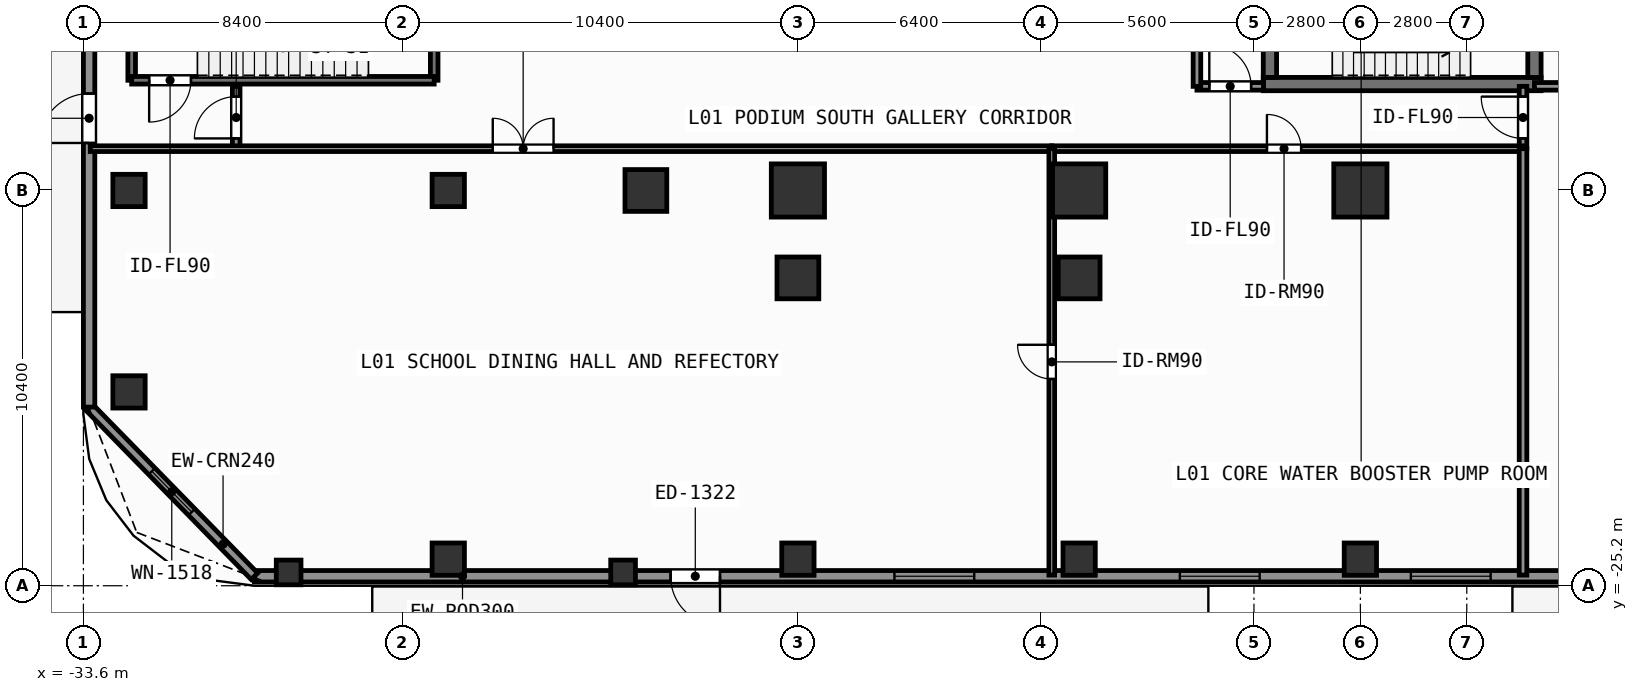
"""IFC4 building model, lengths in metres.
Left out: names, types, materials, properties, quantities, classifications, styles, units other than length and angle.
Written with IfcOpenShell. Run it as: python <this file> out.ifc"""

import sys

from ifc_helpers import new_model, si_unit, direction, frame, frame_2d, origin, origin_2d, place, context, subcontext, project, spatial, rectangle, extrude, element, fill, save


model = new_model("IFC4")
c1 = context("Model", 3, precision=1e-05, world=origin(), true_north=direction((0.0, 1.0)))
c2 = subcontext(c1, "Body", "Model", "MODEL_VIEW")
j1 = project(units=[si_unit("LENGTHUNIT", "METRE"), si_unit("PLANEANGLEUNIT", "RADIAN")], contexts=[c1])
p1 = place(None, origin())
s1 = spatial("IfcSite", under=j1, at=p1, CompositionType="ELEMENT")
p2 = place(p1, origin())
s2 = spatial("IfcBuilding", under=s1, at=p2, CompositionType="ELEMENT")
p3 = place(p2, origin())
s3 = spatial("IfcBuildingStorey", under=s2, at=p3, CompositionType="ELEMENT", Elevation=0.0)
p4 = place(p3, frame((-2.555, -12.0, 0.0), z_axis=(0.0, 0.0, 1.0), x_axis=(1.0, 0.0, 0.0)))
e1 = element("IfcWall", 1, at=p4, inside=s3, PredefinedType="SHEAR", context=c2, shape_type="SweptSolid", body=[
    extrude(rectangle(XDim=7.31, YDim=0.35, at=frame_2d((3.655, 0.0))), origin(), (0.0, 0.0, 1.0), 4.8),
])
p5 = place(p3, frame((-2.38, -11.825, 0.0), z_axis=(0.0, 0.0, 1.0), x_axis=(0.0, 1.0, 0.0)))
e2 = element("IfcWall", 2, at=p5, inside=s3, PredefinedType="SHEAR", context=c2, shape_type="SweptSolid", body=[
    extrude(rectangle(XDim=2.925, YDim=0.35, at=frame_2d((1.462, 0.0))), origin(), (0.0, 0.0, 1.0), 4.8),
])
p6 = place(p3, frame((4.58, -8.9, 0.0), z_axis=(0.0, 0.0, 1.0), x_axis=(0.0, -1.0, 0.0)))
e3 = element("IfcWall", 3, at=p6, inside=s3, PredefinedType="SHEAR", context=c2, shape_type="SweptSolid", body=[
    extrude(rectangle(XDim=2.925, YDim=0.35, at=frame_2d((1.462, 0.0))), origin(), (0.0, 0.0, 1.0), 4.8),
])
p7 = place(p6, frame((0.913, 0.0, 0.0)))
e4 = element("IfcOpeningElement", 4, at=p7, cuts=e3, PredefinedType="OPENING", context=c2, shape_type="SweptSolid", body=[
    extrude(rectangle(XDim=1.1, YDim=2.15, at=frame_2d((0.55, 1.075))), frame((0.0, 0.185, 0.0), z_axis=(0.0, -1.0, 0.0), x_axis=(1.0, 0.0, 0.0)), (0.0, 0.0, 1.0), 0.37),
])
for number, where, z_axis, x_axis in (
    (5, (-14.8, -14.8, 0.0), (0.0, 0.0, 1.0), (1.0, 0.0, 0.0)),
    (6, (-7.4, -14.8, 0.0), (0.0, 0.0, 1.0), (1.0, 0.0, 0.0)),
    (7, (0.0, -14.8, 0.0), (0.0, 0.0, 1.0), (1.0, 0.0, 0.0)),
):
    element("IfcColumn", number, at=place(p3, frame(where, z_axis=z_axis, x_axis=x_axis)), inside=s3, PredefinedType="COLUMN", context=c2, shape_type="SweptSolid", body=[
        extrude(rectangle(XDim=1.4, YDim=1.4, at=origin_2d()), origin(), (0.0, 0.0, 1.0), 4.8),
    ])
for number, where, z_axis, x_axis in (
    (8, (-18.8, -14.8, 0.0), (0.0, 0.0, 1.0), (1.0, 0.0, 0.0)),
    (9, (-14.8, -17.1, 0.0), (0.0, 0.0, 1.0), (1.0, 0.0, 0.0)),
    (10, (-7.4, -17.1, 0.0), (0.0, 0.0, 1.0), (1.0, 0.0, 0.0)),
):
    element("IfcColumn", number, at=place(p3, frame(where, z_axis=z_axis, x_axis=x_axis)), inside=s3, PredefinedType="COLUMN", context=c2, shape_type="SweptSolid", body=[
        extrude(rectangle(XDim=1.1, YDim=1.1, at=origin_2d()), origin(), (0.0, 0.0, 1.0), 4.8),
    ])
for number, where, z_axis, x_axis in (
    (11, (-32.4, -14.8, 0.0), (0.0, 0.0, 1.0), (1.0, 0.0, 0.0)),
    (12, (-24.0, -24.5, 0.0), (0.0, 0.0, 1.0), (1.0, 0.0, 0.0)),
    (13, (-24.0, -14.8, 0.0), (0.0, 0.0, 1.0), (1.0, 0.0, 0.0)),
    (14, (-14.8, -24.5, 0.0), (0.0, 0.0, 1.0), (1.0, 0.0, 0.0)),
    (15, (-7.4, -24.5, 0.0), (0.0, 0.0, 1.0), (1.0, 0.0, 0.0)),
    (16, (0.0, -24.5, 0.0), (0.0, 0.0, 1.0), (1.0, 0.0, 0.0)),
    (17, (-32.4, -20.1, 0.0), (0.0, 0.0, 1.0), (1.0, 0.0, 0.0)),
):
    element("IfcColumn", number, at=place(p3, frame(where, z_axis=z_axis, x_axis=x_axis)), inside=s3, PredefinedType="COLUMN", context=c2, shape_type="SweptSolid", body=[
        extrude(rectangle(XDim=0.85, YDim=0.85, at=origin_2d()), origin(), (0.0, 0.0, 1.0), 4.8),
    ])
for number, where, z_axis, x_axis in (
    (18, (-28.2, -24.85, 0.0), (0.0, 0.0, 1.0), (1.0, 0.0, 0.0)),
    (19, (-19.4, -24.85, 0.0), (0.0, 0.0, 1.0), (1.0, 0.0, 0.0)),
):
    element("IfcColumn", number, at=place(p3, frame(where, z_axis=z_axis, x_axis=x_axis)), inside=s3, PredefinedType="PILASTER", context=c2, shape_type="SweptSolid", body=[
        extrude(rectangle(XDim=0.65, YDim=0.65, at=origin_2d()), origin(), (0.0, 0.0, 1.0), 4.8),
    ])
p8 = place(p3, frame((29.1, -24.95, 0.0), z_axis=(0.0, 0.0, 1.0), x_axis=(-1.0, 0.0, 0.0)))
e20 = element("IfcWall", 20, at=p8, inside=s3, PredefinedType="SOLIDWALL", context=c2, shape_type="SweptSolid", body=[
    extrude(rectangle(XDim=58.2, YDim=0.3, at=frame_2d((29.1, 0.0))), origin(), (0.0, 0.0, 1.0), 4.56),
])
p9 = place(p8, frame((39.26, 0.0, 0.85)))
e21 = element("IfcOpeningElement", 21, at=p9, cuts=e20, PredefinedType="OPENING", context=c2, shape_type="SweptSolid", body=[
    extrude(rectangle(XDim=2.1, YDim=2.2, at=frame_2d((1.05, 1.1))), frame((0.0, 0.16, 0.0), z_axis=(0.0, -1.0, 0.0), x_axis=(1.0, 0.0, 0.0)), (0.0, 0.0, 1.0), 0.32),
])
p10 = place(p8, frame((31.75, 0.0, 0.85)))
e22 = element("IfcOpeningElement", 22, at=p10, cuts=e20, PredefinedType="OPENING", context=c2, shape_type="SweptSolid", body=[
    extrude(rectangle(XDim=2.1, YDim=2.2, at=frame_2d((1.05, 1.1))), frame((0.0, 0.16, 0.0), z_axis=(0.0, -1.0, 0.0), x_axis=(1.0, 0.0, 0.0)), (0.0, 0.0, 1.0), 0.32),
])
p11 = place(p8, frame((25.672, 0.0, 0.85)))
e23 = element("IfcOpeningElement", 23, at=p11, cuts=e20, PredefinedType="OPENING", context=c2, shape_type="SweptSolid", body=[
    extrude(rectangle(XDim=2.1, YDim=2.2, at=frame_2d((1.05, 1.1))), frame((0.0, 0.16, 0.0), z_axis=(0.0, -1.0, 0.0), x_axis=(1.0, 0.0, 0.0)), (0.0, 0.0, 1.0), 0.32),
])
p12 = place(p8, frame((17.65, 0.0, 0.0)))
e24 = element("IfcOpeningElement", 24, at=p12, cuts=e20, PredefinedType="OPENING", context=c2, shape_type="SweptSolid", body=[
    extrude(rectangle(XDim=1.3, YDim=2.2, at=frame_2d((0.65, 1.1))), frame((0.0, 0.16, 0.0), z_axis=(0.0, -1.0, 0.0), x_axis=(1.0, 0.0, 0.0)), (0.0, 0.0, 1.0), 0.32),
])
p13 = place(p8, frame((6.75, 0.0, 0.0)))
e25 = element("IfcOpeningElement", 25, at=p13, cuts=e20, PredefinedType="OPENING", context=c2, shape_type="SweptSolid", body=[
    extrude(rectangle(XDim=1.3, YDim=2.2, at=frame_2d((0.65, 1.1))), frame((0.0, 0.16, 0.0), z_axis=(0.0, -1.0, 0.0), x_axis=(1.0, 0.0, 0.0)), (0.0, 0.0, 1.0), 0.32),
])
p14 = place(p8, frame((45.95, 0.0, 0.0)))
e26 = element("IfcOpeningElement", 26, at=p14, cuts=e20, PredefinedType="OPENING", context=c2, shape_type="SweptSolid", body=[
    extrude(rectangle(XDim=1.3, YDim=2.2, at=frame_2d((0.65, 1.1))), frame((0.0, 0.16, 0.0), z_axis=(0.0, -1.0, 0.0), x_axis=(1.0, 0.0, 0.0)), (0.0, 0.0, 1.0), 0.32),
])
p15 = place(p3, frame((-29.1, -24.95, 0.0), z_axis=(0.0, 0.0, 1.0), x_axis=(-0.69901822973, 0.715103848756, 0.0)))
e27 = element("IfcWall", 27, at=p15, inside=s3, PredefinedType="SOLIDWALL", context=c2, shape_type="SweptSolid", body=[
    extrude(rectangle(XDim=6.223, YDim=0.24, at=frame_2d((3.111, 0.0))), origin(), (0.0, 0.0, 1.0), 4.56),
])
p16 = place(p15, frame((2.362, 0.0, 0.85)))
e28 = element("IfcOpeningElement", 28, at=p16, cuts=e27, PredefinedType="OPENING", context=c2, shape_type="SweptSolid", body=[
    extrude(rectangle(XDim=1.5, YDim=1.85, at=frame_2d((0.75, 0.925))), frame((0.0, 0.13, 0.0), z_axis=(0.0, -1.0, 0.0), x_axis=(1.0, 0.0, 0.0)), (0.0, 0.0, 1.0), 0.26),
])
p17 = place(p3, frame((-33.45, -20.5, 0.0), z_axis=(0.0, 0.0, 1.0), x_axis=(0.0, 1.0, 0.0)))
e29 = element("IfcWall", 29, at=p17, inside=s3, PredefinedType="SOLIDWALL", context=c2, shape_type="SweptSolid", body=[
    extrude(rectangle(XDim=41.0, YDim=0.3, at=frame_2d((20.5, 0.0))), origin(), (0.0, 0.0, 1.0), 4.56),
])
p18 = place(p17, frame((15.9, 0.0, 0.0)))
e30 = element("IfcOpeningElement", 30, at=p18, cuts=e29, PredefinedType="OPENING", context=c2, shape_type="SweptSolid", body=[
    extrude(rectangle(XDim=2.0, YDim=2.4, at=frame_2d((1.0, 1.2))), frame((0.0, 0.16, 0.0), z_axis=(0.0, -1.0, 0.0), x_axis=(1.0, 0.0, 0.0)), (0.0, 0.0, 1.0), 0.32),
])
p19 = place(p17, frame((23.1, 0.0, 0.0)))
e31 = element("IfcOpeningElement", 31, at=p19, cuts=e29, PredefinedType="OPENING", context=c2, shape_type="SweptSolid", body=[
    extrude(rectangle(XDim=2.0, YDim=2.4, at=frame_2d((1.0, 1.2))), frame((0.0, 0.16, 0.0), z_axis=(0.0, -1.0, 0.0), x_axis=(1.0, 0.0, 0.0)), (0.0, 0.0, 1.0), 0.32),
])
p20 = place(p17, frame((6.95, 0.0, 0.0)))
e32 = element("IfcOpeningElement", 32, at=p20, cuts=e29, PredefinedType="OPENING", context=c2, shape_type="SweptSolid", body=[
    extrude(rectangle(XDim=1.3, YDim=2.2, at=frame_2d((0.65, 1.1))), frame((0.0, 0.16, 0.0), z_axis=(0.0, -1.0, 0.0), x_axis=(1.0, 0.0, 0.0)), (0.0, 0.0, 1.0), 0.32),
])
p21 = place(p17, frame((32.75, 0.0, 0.0)))
e33 = element("IfcOpeningElement", 33, at=p21, cuts=e29, PredefinedType="OPENING", context=c2, shape_type="SweptSolid", body=[
    extrude(rectangle(XDim=1.3, YDim=2.2, at=frame_2d((0.65, 1.1))), frame((0.0, 0.16, 0.0), z_axis=(0.0, -1.0, 0.0), x_axis=(1.0, 0.0, 0.0)), (0.0, 0.0, 1.0), 0.32),
])
for number, where, z_axis, x_axis in (
    (34, (-32.33, -11.9, 0.0), (0.0, 0.0, 1.0), (0.0, 1.0, 0.0)),
    (35, (-24.37, -8.48, 0.0), (0.0, 0.0, 1.0), (0.0, -1.0, 0.0)),
):
    element("IfcWall", number, at=place(p3, frame(where, z_axis=z_axis, x_axis=x_axis)), inside=s3, PredefinedType="SHEAR", context=c2, shape_type="SweptSolid", body=[
        extrude(rectangle(XDim=3.42, YDim=0.2, at=frame_2d((1.71, 0.0))), origin(), (0.0, 0.0, 1.0), 4.56),
    ])
p22 = place(p3, frame((-24.37, -11.9, 0.0), z_axis=(0.0, 0.0, 1.0), x_axis=(-1.0, 0.0, 0.0)))
e36 = element("IfcWall", 36, at=p22, inside=s3, PredefinedType="SHEAR", context=c2, shape_type="SweptSolid", body=[
    extrude(rectangle(XDim=7.96, YDim=0.2, at=frame_2d((3.98, 0.0))), origin(), (0.0, 0.0, 1.0), 4.56),
])
p23 = place(p22, frame((6.4, 0.0, 0.0)))
e37 = element("IfcOpeningElement", 37, at=p23, cuts=e36, PredefinedType="OPENING", context=c2, shape_type="SweptSolid", body=[
    extrude(rectangle(XDim=1.1, YDim=2.15, at=frame_2d((0.55, 1.075))), frame((0.0, 0.11, 0.0), z_axis=(0.0, -1.0, 0.0), x_axis=(1.0, 0.0, 0.0)), (0.0, 0.0, 1.0), 0.22),
])
p24 = place(p3, frame((4.58, -12.06, 0.0), z_axis=(0.0, 0.0, 1.0), x_axis=(1.0, 0.0, 0.0)))
e38 = element("IfcWall", 38, at=p24, inside=s3, PredefinedType="SOLIDWALL", context=c2, shape_type="SweptSolid", body=[
    extrude(rectangle(XDim=3.7, YDim=0.2, at=frame_2d((1.85, 0.0))), origin(), (0.0, 0.0, 1.0), 4.56),
])
p25 = place(p24, frame((1.212, 0.0, 0.0)))
e39 = element("IfcOpeningElement", 39, at=p25, cuts=e38, PredefinedType="OPENING", context=c2, shape_type="SweptSolid", body=[
    extrude(rectangle(XDim=1.1, YDim=2.15, at=frame_2d((0.55, 1.075))), frame((0.0, 0.11, 0.0), z_axis=(0.0, -1.0, 0.0), x_axis=(1.0, 0.0, 0.0)), (0.0, 0.0, 1.0), 0.22),
])
p26 = place(p3, frame((-4.3, -12.06, 0.0), z_axis=(0.0, 0.0, 1.0), x_axis=(1.0, 0.0, 0.0)))
e40 = element("IfcWall", 40, at=p26, inside=s3, PredefinedType="SOLIDWALL", context=c2, shape_type="SweptSolid", body=[
    extrude(rectangle(XDim=1.75, YDim=0.2, at=frame_2d((0.875, 0.0))), origin(), (0.0, 0.0, 1.0), 4.56),
])
p27 = place(p26, frame((0.325, 0.0, 0.0)))
e41 = element("IfcOpeningElement", 41, at=p27, cuts=e40, PredefinedType="OPENING", context=c2, shape_type="SweptSolid", body=[
    extrude(rectangle(XDim=1.1, YDim=2.15, at=frame_2d((0.55, 1.075))), frame((0.0, 0.11, 0.0), z_axis=(0.0, -1.0, 0.0), x_axis=(1.0, 0.0, 0.0)), (0.0, 0.0, 1.0), 0.22),
])
p28 = place(p3, frame((-29.58, -13.7, 0.0), z_axis=(0.0, 0.0, 1.0), x_axis=(0.0, 1.0, 0.0)))
e42 = element("IfcWall", 42, at=p28, inside=s3, PredefinedType="SOLIDWALL", context=c2, shape_type="SweptSolid", body=[
    extrude(rectangle(XDim=1.64, YDim=0.2, at=frame_2d((0.82, 0.0))), origin(), (0.0, 0.0, 1.0), 4.56),
])
p29 = place(p28, frame((0.27, 0.0, 0.0)))
e43 = element("IfcOpeningElement", 43, at=p29, cuts=e42, PredefinedType="OPENING", context=c2, shape_type="SweptSolid", body=[
    extrude(rectangle(XDim=1.1, YDim=2.15, at=frame_2d((0.55, 1.075))), frame((0.0, 0.11, 0.0), z_axis=(0.0, -1.0, 0.0), x_axis=(1.0, 0.0, 0.0)), (0.0, 0.0, 1.0), 0.22),
])
p30 = place(p3, frame((4.28, -13.7, 0.0), z_axis=(0.0, 0.0, 1.0), x_axis=(0.0, 1.0, 0.0)))
e44 = element("IfcWall", 44, at=p30, inside=s3, PredefinedType="SOLIDWALL", context=c2, shape_type="SweptSolid", body=[
    extrude(rectangle(XDim=1.64, YDim=0.2, at=frame_2d((0.82, 0.0))), origin(), (0.0, 0.0, 1.0), 4.56),
])
p31 = place(p30, frame((0.27, 0.0, 0.0)))
e45 = element("IfcOpeningElement", 45, at=p31, cuts=e44, PredefinedType="OPENING", context=c2, shape_type="SweptSolid", body=[
    extrude(rectangle(XDim=1.1, YDim=2.15, at=frame_2d((0.55, 1.075))), frame((0.0, 0.11, 0.0), z_axis=(0.0, -1.0, 0.0), x_axis=(1.0, 0.0, 0.0)), (0.0, 0.0, 1.0), 0.22),
])
p32 = place(p3, frame((-33.42, -13.7, 0.0), z_axis=(0.0, 0.0, 1.0), x_axis=(1.0, 0.0, 0.0)))
e46 = element("IfcWall", 46, at=p32, inside=s3, PredefinedType="PARTITIONING", context=c2, shape_type="SweptSolid", body=[
    extrude(rectangle(XDim=25.3, YDim=0.15, at=frame_2d((12.65, 0.0))), origin(), (0.0, 0.0, 1.0), 4.56),
])
p33 = place(p32, frame((10.591, 0.0, 0.0)))
e47 = element("IfcOpeningElement", 47, at=p33, cuts=e46, PredefinedType="OPENING", context=c2, shape_type="SweptSolid", body=[
    extrude(rectangle(XDim=1.6, YDim=2.3, at=frame_2d((0.8, 1.15))), frame((0.0, 0.085, 0.0), z_axis=(0.0, -1.0, 0.0), x_axis=(1.0, 0.0, 0.0)), (0.0, 0.0, 1.0), 0.17),
])
p34 = place(p3, frame((-8.12, -13.7, 0.0), z_axis=(0.0, 0.0, 1.0), x_axis=(1.0, 0.0, 0.0)))
e48 = element("IfcWall", 48, at=p34, inside=s3, PredefinedType="PARTITIONING", context=c2, shape_type="SweptSolid", body=[
    extrude(rectangle(XDim=12.4, YDim=0.15, at=frame_2d((6.2, 0.0))), origin(), (0.0, 0.0, 1.0), 4.56),
])
p35 = place(p34, frame((5.661, 0.0, 0.0)))
e49 = element("IfcOpeningElement", 49, at=p35, cuts=e48, PredefinedType="OPENING", context=c2, shape_type="SweptSolid", body=[
    extrude(rectangle(XDim=0.9, YDim=2.1, at=frame_2d((0.45, 1.05))), frame((0.0, 0.085, 0.0), z_axis=(0.0, -1.0, 0.0), x_axis=(1.0, 0.0, 0.0)), (0.0, 0.0, 1.0), 0.17),
])
p36 = place(p3, frame((-8.12, -24.92, 0.0), z_axis=(0.0, 0.0, 1.0), x_axis=(0.0, 1.0, 0.0)))
e50 = element("IfcWall", 50, at=p36, inside=s3, PredefinedType="PARTITIONING", context=c2, shape_type="SweptSolid", body=[
    extrude(rectangle(XDim=11.22, YDim=0.15, at=frame_2d((5.61, 0.0))), origin(), (0.0, 0.0, 1.0), 4.56),
])
p37 = place(p36, frame((5.16, 0.0, 0.0)))
e51 = element("IfcOpeningElement", 51, at=p37, cuts=e50, PredefinedType="OPENING", context=c2, shape_type="SweptSolid", body=[
    extrude(rectangle(XDim=0.9, YDim=2.1, at=frame_2d((0.45, 1.05))), frame((0.0, 0.085, 0.0), z_axis=(0.0, -1.0, 0.0), x_axis=(1.0, 0.0, 0.0)), (0.0, 0.0, 1.0), 0.17),
])
p38 = place(p3, frame((-4.3, -12.06, 0.0), z_axis=(0.0, 0.0, 1.0), x_axis=(0.0, 1.0, 0.0)))
e52 = element("IfcWall", 52, at=p38, inside=s3, PredefinedType="SOLIDWALL", context=c2, shape_type="SweptSolid", body=[
    extrude(rectangle(XDim=3.11, YDim=0.2, at=frame_2d((1.555, 0.0))), origin(), (0.0, 0.0, 1.0), 4.56),
])
p39 = place(p3, frame((4.28, -24.92, 0.0), z_axis=(0.0, 0.0, 1.0), x_axis=(0.0, 1.0, 0.0)))
e53 = element("IfcWall", 53, at=p39, inside=s3, PredefinedType="SOLIDWALL", context=c2, shape_type="SweptSolid", body=[
    extrude(rectangle(XDim=11.22, YDim=0.2, at=frame_2d((5.61, 0.0))), origin(), (0.0, 0.0, 1.0), 4.56),
])
p40 = place(p16, origin())
e54 = element("IfcWindow", 54, at=p40, inside=s3, PartitioningType="SINGLE_PANEL", PredefinedType="WINDOW", context=c2, shape_type="SweptSolid", body=[
    extrude(rectangle(XDim=1.5, YDim=1.85, at=frame_2d((0.75, 0.925))), frame((0.0, 0.03, 0.0), z_axis=(0.0, -1.0, 0.0), x_axis=(1.0, 0.0, 0.0)), (0.0, 0.0, 1.0), 0.06),
])
fill(e28, e54)
p41 = place(p9, origin())
e55 = element("IfcWindow", 55, at=p41, inside=s3, PartitioningType="SINGLE_PANEL", PredefinedType="WINDOW", context=c2, shape_type="SweptSolid", body=[
    extrude(rectangle(XDim=2.1, YDim=2.2, at=frame_2d((1.05, 1.1))), frame((0.0, 0.03, 0.0), z_axis=(0.0, -1.0, 0.0), x_axis=(1.0, 0.0, 0.0)), (0.0, 0.0, 1.0), 0.06),
])
fill(e21, e55)
p42 = place(p10, origin())
e56 = element("IfcWindow", 56, at=p42, inside=s3, PartitioningType="SINGLE_PANEL", PredefinedType="WINDOW", context=c2, shape_type="SweptSolid", body=[
    extrude(rectangle(XDim=2.1, YDim=2.2, at=frame_2d((1.05, 1.1))), frame((0.0, 0.03, 0.0), z_axis=(0.0, -1.0, 0.0), x_axis=(1.0, 0.0, 0.0)), (0.0, 0.0, 1.0), 0.06),
])
fill(e22, e56)
p43 = place(p11, origin())
e57 = element("IfcWindow", 57, at=p43, inside=s3, PartitioningType="SINGLE_PANEL", PredefinedType="WINDOW", context=c2, shape_type="SweptSolid", body=[
    extrude(rectangle(XDim=2.1, YDim=2.2, at=frame_2d((1.05, 1.1))), frame((0.0, 0.03, 0.0), z_axis=(0.0, -1.0, 0.0), x_axis=(1.0, 0.0, 0.0)), (0.0, 0.0, 1.0), 0.06),
])
fill(e23, e57)
p44 = place(p20, origin())
e58 = element("IfcDoor", 58, at=p44, inside=s3, OperationType="SINGLE_SWING_LEFT", PredefinedType="DOOR", context=c2, shape_type="SweptSolid", body=[
    extrude(rectangle(XDim=1.3, YDim=2.2, at=frame_2d((0.65, 1.1))), frame((0.0, 0.025, 0.0), z_axis=(0.0, -1.0, 0.0), x_axis=(1.0, 0.0, 0.0)), (0.0, 0.0, 1.0), 0.05),
])
fill(e32, e58)
p45 = place(p14, origin())
e59 = element("IfcDoor", 59, at=p45, inside=s3, OperationType="SINGLE_SWING_LEFT", PredefinedType="DOOR", context=c2, shape_type="SweptSolid", body=[
    extrude(rectangle(XDim=1.3, YDim=2.2, at=frame_2d((0.65, 1.1))), frame((0.0, 0.025, 0.0), z_axis=(0.0, -1.0, 0.0), x_axis=(1.0, 0.0, 0.0)), (0.0, 0.0, 1.0), 0.05),
])
fill(e26, e59)
p46 = place(p23, origin())
e60 = element("IfcDoor", 60, at=p46, inside=s3, OperationType="SINGLE_SWING_RIGHT", PredefinedType="DOOR", context=c2, shape_type="SweptSolid", body=[
    extrude(rectangle(XDim=1.1, YDim=2.15, at=frame_2d((0.55, 1.075))), frame((0.0, 0.025, 0.0), z_axis=(0.0, -1.0, 0.0), x_axis=(1.0, 0.0, 0.0)), (0.0, 0.0, 1.0), 0.05),
])
fill(e37, e60)
p47 = place(p27, origin())
e61 = element("IfcDoor", 61, at=p47, inside=s3, OperationType="SINGLE_SWING_LEFT", PredefinedType="DOOR", context=c2, shape_type="SweptSolid", body=[
    extrude(rectangle(XDim=1.1, YDim=2.15, at=frame_2d((0.55, 1.075))), frame((0.0, 0.025, 0.0), z_axis=(0.0, -1.0, 0.0), x_axis=(1.0, 0.0, 0.0)), (0.0, 0.0, 1.0), 0.05),
])
fill(e41, e61)
p48 = place(p29, origin())
e62 = element("IfcDoor", 62, at=p48, inside=s3, OperationType="SINGLE_SWING_LEFT", PredefinedType="DOOR", context=c2, shape_type="SweptSolid", body=[
    extrude(rectangle(XDim=1.1, YDim=2.15, at=frame_2d((0.55, 1.075))), frame((0.0, 0.025, 0.0), z_axis=(0.0, -1.0, 0.0), x_axis=(1.0, 0.0, 0.0)), (0.0, 0.0, 1.0), 0.05),
])
fill(e43, e62)
p49 = place(p31, origin())
e63 = element("IfcDoor", 63, at=p49, inside=s3, OperationType="SINGLE_SWING_RIGHT", PredefinedType="DOOR", context=c2, shape_type="SweptSolid", body=[
    extrude(rectangle(XDim=1.1, YDim=2.15, at=frame_2d((0.55, 1.075))), frame((0.0, 0.025, 0.0), z_axis=(0.0, -1.0, 0.0), x_axis=(1.0, 0.0, 0.0)), (0.0, 0.0, 1.0), 0.05),
])
fill(e45, e63)
p50 = place(p33, origin())
e64 = element("IfcDoor", 64, at=p50, inside=s3, OperationType="SINGLE_SWING_LEFT", PredefinedType="DOOR", context=c2, shape_type="SweptSolid", body=[
    extrude(rectangle(XDim=1.6, YDim=2.3, at=frame_2d((0.8, 1.15))), frame((0.0, 0.025, 0.0), z_axis=(0.0, -1.0, 0.0), x_axis=(1.0, 0.0, 0.0)), (0.0, 0.0, 1.0), 0.05),
])
fill(e47, e64)
p51 = place(p35, origin())
e65 = element("IfcDoor", 65, at=p51, inside=s3, OperationType="SINGLE_SWING_LEFT", PredefinedType="DOOR", context=c2, shape_type="SweptSolid", body=[
    extrude(rectangle(XDim=0.9, YDim=2.1, at=frame_2d((0.45, 1.05))), frame((0.0, 0.025, 0.0), z_axis=(0.0, -1.0, 0.0), x_axis=(1.0, 0.0, 0.0)), (0.0, 0.0, 1.0), 0.05),
])
fill(e49, e65)
p52 = place(p37, origin())
e66 = element("IfcDoor", 66, at=p52, inside=s3, OperationType="SINGLE_SWING_RIGHT", PredefinedType="DOOR", context=c2, shape_type="SweptSolid", body=[
    extrude(rectangle(XDim=0.9, YDim=2.1, at=frame_2d((0.45, 1.05))), frame((0.0, 0.025, 0.0), z_axis=(0.0, -1.0, 0.0), x_axis=(1.0, 0.0, 0.0)), (0.0, 0.0, 1.0), 0.05),
])
fill(e51, e66)
save(model, sys.argv[1])
